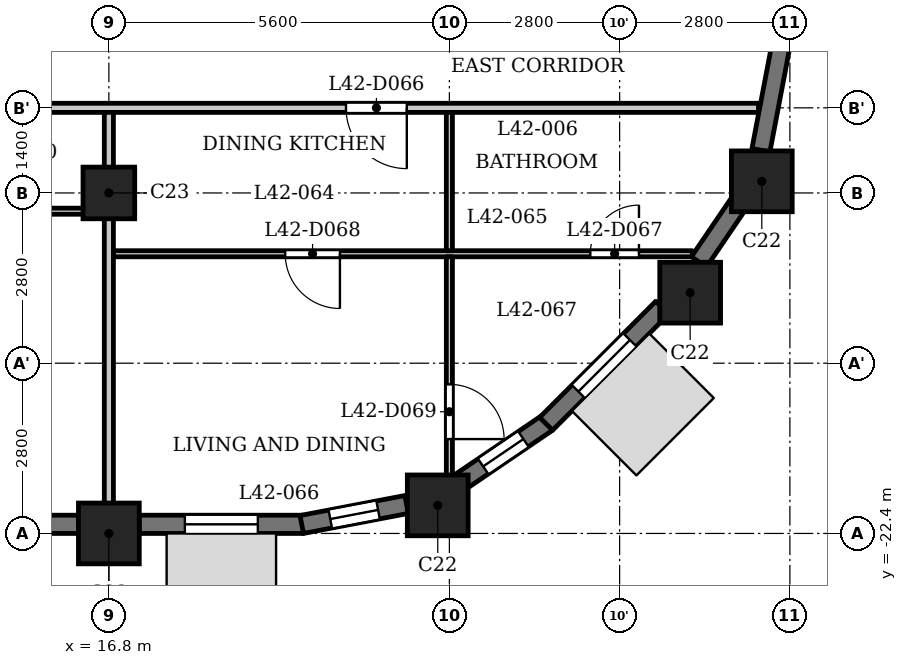
"""IFC4 building model, lengths in metres.
Left out: names, types, materials, properties, quantities, classifications, styles, units other than length and angle.
Written with IfcOpenShell. Run it as: python <this file> out.ifc"""

import sys

from ifc_helpers import new_model, si_unit, direction, frame, frame_2d, origin, origin_2d, place, context, subcontext, project, spatial, rectangle, extrude, element, fill, save


model = new_model("IFC4")
c1 = context("Model", 3, precision=1e-05, world=origin(), true_north=direction((0.0, 1.0)))
c2 = subcontext(c1, "Body", "Model", "MODEL_VIEW")
j1 = project(units=[si_unit("LENGTHUNIT", "METRE"), si_unit("PLANEANGLEUNIT", "RADIAN")], contexts=[c1])
p1 = place(None, origin())
s1 = spatial("IfcSite", under=j1, at=p1, CompositionType="ELEMENT")
p2 = place(p1, origin())
s2 = spatial("IfcBuilding", under=s1, at=p2, CompositionType="ELEMENT")
p3 = place(p2, frame((0.0, 0.0, 164.1)))
s3 = spatial("IfcBuildingStorey", under=s2, at=p3, CompositionType="ELEMENT", Elevation=164.1)
for number, where, z_axis, x_axis in (
    (1, (16.8, -22.4, 0.0), (0.0, 0.0, 1.0), (1.0, 0.0, 0.0)),
    (2, (22.209, -21.938, 0.0), (0.0, 0.0, 1.0), (1.0, 0.0, 0.0)),
    (3, (26.36, -18.44, 0.0), (0.0, 0.0, 1.0), (1.0, 0.0, 0.0)),
    (4, (27.538, -16.609, 0.0), (0.0, 0.0, 1.0), (1.0, 0.0, 0.0)),
):
    element("IfcColumn", number, at=place(p3, frame(where, z_axis=z_axis, x_axis=x_axis)), inside=s3, PredefinedType="COLUMN", context=c2, shape_type="SweptSolid", body=[
        extrude(rectangle(XDim=1.0, YDim=1.0, at=origin_2d()), origin(), (0.0, 0.0, 1.0), 3.5),
    ])
p4 = place(p3, frame((16.8, -16.8, 0.0), z_axis=(0.0, 0.0, 1.0), x_axis=(1.0, 0.0, 0.0)))
e5 = element("IfcColumn", 5, at=p4, inside=s3, PredefinedType="COLUMN", context=c2, shape_type="SweptSolid", body=[
    extrude(rectangle(XDim=0.85, YDim=0.85, at=origin_2d()), origin(), (0.0, 0.0, 1.0), 3.5),
])
p5 = place(p3, frame((11.7, -22.25, 0.0), z_axis=(0.0, 0.0, 1.0), x_axis=(1.0, 0.0, 0.0)))
e6 = element("IfcWall", 6, at=p5, inside=s3, PredefinedType="SOLIDWALL", context=c2, shape_type="SweptSolid", body=[
    extrude(rectangle(XDim=4.6, YDim=0.3, at=frame_2d((2.3, 0.0))), origin(), (0.0, 0.0, 1.0), 2.45),
])
p6 = place(p5, frame((0.5, 0.0, 1.2)))
e7 = element("IfcOpeningElement", 7, at=p6, cuts=e6, PredefinedType="OPENING", context=c2, shape_type="SweptSolid", body=[
    extrude(rectangle(XDim=3.6, YDim=0.95, at=frame_2d((1.8, 0.475))), frame((0.0, 0.16, 0.0), z_axis=(0.0, -1.0, 0.0), x_axis=(1.0, 0.0, 0.0)), (0.0, 0.0, 1.0), 0.32),
])
p7 = place(p3, frame((17.3, -22.25, 0.0), z_axis=(0.0, 0.0, 1.0), x_axis=(1.0, 0.0, 0.0)))
e8 = element("IfcWall", 8, at=p7, inside=s3, PredefinedType="SOLIDWALL", context=c2, shape_type="SweptSolid", body=[
    extrude(rectangle(XDim=2.7, YDim=0.3, at=frame_2d((1.35, 0.0))), origin(), (0.0, 0.0, 1.0), 2.45),
])
p8 = place(p7, frame((0.75, 0.0, 0.6)))
e9 = element("IfcOpeningElement", 9, at=p8, cuts=e8, PredefinedType="OPENING", context=c2, shape_type="SweptSolid", body=[
    extrude(rectangle(XDim=1.2, YDim=1.55, at=frame_2d((0.6, 0.775))), frame((0.0, 0.16, 0.0), z_axis=(0.0, -1.0, 0.0), x_axis=(1.0, 0.0, 0.0)), (0.0, 0.0, 1.0), 0.32),
])
p9 = place(p3, frame((19.972, -22.253, 0.0), z_axis=(0.0, 0.0, 1.0), x_axis=(0.982284988433, 0.187393173565, 0.0)))
e10 = element("IfcWall", 10, at=p9, inside=s3, PredefinedType="SOLIDWALL", context=c2, shape_type="SweptSolid", body=[
    extrude(rectangle(XDim=1.756, YDim=0.3, at=frame_2d((0.878, 0.0))), origin(), (0.0, 0.0, 1.0), 2.45),
])
p10 = place(p9, frame((0.478, 0.0, 0.6)))
e11 = element("IfcOpeningElement", 11, at=p10, cuts=e10, PredefinedType="OPENING", context=c2, shape_type="SweptSolid", body=[
    extrude(rectangle(XDim=0.8, YDim=1.55, at=frame_2d((0.4, 0.775))), frame((0.0, 0.16, 0.0), z_axis=(0.0, -1.0, 0.0), x_axis=(1.0, 0.0, 0.0)), (0.0, 0.0, 1.0), 0.32),
])
p11 = place(p3, frame((22.56, -21.566, 0.0), z_axis=(0.0, 0.0, 1.0), x_axis=(0.82707645233, 0.562089443061, 0.0)))
e12 = element("IfcWall", 12, at=p11, inside=s3, PredefinedType="SOLIDWALL", context=c2, shape_type="SweptSolid", body=[
    extrude(rectangle(XDim=1.756, YDim=0.3, at=frame_2d((0.878, 0.0))), origin(), (0.0, 0.0, 1.0), 2.45),
])
p12 = place(p11, frame((0.478, 0.0, 0.6)))
e13 = element("IfcOpeningElement", 13, at=p12, cuts=e12, PredefinedType="OPENING", context=c2, shape_type="SweptSolid", body=[
    extrude(rectangle(XDim=0.8, YDim=1.55, at=frame_2d((0.4, 0.775))), frame((0.0, 0.16, 0.0), z_axis=(0.0, -1.0, 0.0), x_axis=(1.0, 0.0, 0.0)), (0.0, 0.0, 1.0), 0.32),
])
p13 = place(p3, frame((23.991, -20.597, 0.0), z_axis=(0.0, 0.0, 1.0), x_axis=(0.707106781187, 0.707106781187, 0.0)))
e14 = element("IfcWall", 14, at=p13, inside=s3, PredefinedType="SOLIDWALL", context=c2, shape_type="SweptSolid", body=[
    extrude(rectangle(XDim=2.7, YDim=0.3, at=frame_2d((1.35, 0.0))), origin(), (0.0, 0.0, 1.0), 2.45),
])
p14 = place(p13, frame((0.75, 0.0, 0.6)))
e15 = element("IfcOpeningElement", 15, at=p14, cuts=e14, PredefinedType="OPENING", context=c2, shape_type="SweptSolid", body=[
    extrude(rectangle(XDim=1.2, YDim=1.55, at=frame_2d((0.6, 0.775))), frame((0.0, 0.16, 0.0), z_axis=(0.0, -1.0, 0.0), x_axis=(1.0, 0.0, 0.0)), (0.0, 0.0, 1.0), 0.32),
])
p15 = place(p3, frame((26.504, -17.934, 0.0), z_axis=(0.0, 0.0, 1.0), x_axis=(0.562145470373, 0.827038372833, 0.0)))
e16 = element("IfcWall", 16, at=p15, inside=s3, PredefinedType="SOLIDWALL", context=c2, shape_type="SweptSolid", body=[
    extrude(rectangle(XDim=1.177, YDim=0.3, at=frame_2d((0.588, 0.0))), origin(), (0.0, 0.0, 1.0), 3.2),
])
p16 = place(p3, frame((27.524, -16.097, 0.0), z_axis=(0.0, 0.0, 1.0), x_axis=(0.187259034321, 0.982310569049, 0.0)))
e17 = element("IfcWall", 17, at=p16, inside=s3, PredefinedType="SOLIDWALL", context=c2, shape_type="SweptSolid", body=[
    extrude(rectangle(XDim=1.756, YDim=0.3, at=frame_2d((0.878, 0.0))), origin(), (0.0, 0.0, 1.0), 2.45),
])
p17 = place(p3, frame((16.875, -17.8, 0.0), z_axis=(0.0, 0.0, 1.0), x_axis=(1.0, 0.0, 0.0)))
e18 = element("IfcWall", 18, at=p17, inside=s3, PredefinedType="PARTITIONING", context=c2, shape_type="SweptSolid", body=[
    extrude(rectangle(XDim=9.519, YDim=0.1, at=frame_2d((4.76, 0.0))), origin(), (0.0, 0.0, 1.0), 3.2),
])
p18 = place(p17, frame((7.843, 0.0, 0.0)))
e19 = element("IfcOpeningElement", 19, at=p18, cuts=e18, PredefinedType="OPENING", context=c2, shape_type="SweptSolid", body=[
    extrude(rectangle(XDim=0.8, YDim=2.1, at=frame_2d((0.4, 1.05))), frame((0.0, 0.06, 0.0), z_axis=(0.0, -1.0, 0.0), x_axis=(1.0, 0.0, 0.0)), (0.0, 0.0, 1.0), 0.12),
])
p19 = place(p17, frame((2.825, 0.0, 0.0)))
e20 = element("IfcOpeningElement", 20, at=p19, cuts=e18, PredefinedType="OPENING", context=c2, shape_type="SweptSolid", body=[
    extrude(rectangle(XDim=0.9, YDim=2.1, at=frame_2d((0.45, 1.05))), frame((0.0, 0.06, 0.0), z_axis=(0.0, -1.0, 0.0), x_axis=(1.0, 0.0, 0.0)), (0.0, 0.0, 1.0), 0.12),
])
p20 = place(p3, frame((-16.725, -17.1, 0.0), z_axis=(0.0, 0.0, 1.0), x_axis=(1.0, 0.0, 0.0)))
e21 = element("IfcWall", 21, at=p20, inside=s3, PredefinedType="PARTITIONING", context=c2, shape_type="SweptSolid", body=[
    extrude(rectangle(XDim=33.45, YDim=0.1, at=frame_2d((16.725, 0.0))), origin(), (0.0, 0.0, 1.0), 3.2),
])
p21 = place(p20, frame((0.725, 0.0, 0.0)))
e22 = element("IfcOpeningElement", 22, at=p21, cuts=e21, PredefinedType="OPENING", context=c2, shape_type="SweptSolid", body=[
    extrude(rectangle(XDim=0.8, YDim=2.1, at=frame_2d((0.4, 1.05))), frame((0.0, 0.06, 0.0), z_axis=(0.0, -1.0, 0.0), x_axis=(1.0, 0.0, 0.0)), (0.0, 0.0, 1.0), 0.12),
])
p22 = place(p20, frame((3.175, 0.0, 0.0)))
e23 = element("IfcOpeningElement", 23, at=p22, cuts=e21, PredefinedType="OPENING", context=c2, shape_type="SweptSolid", body=[
    extrude(rectangle(XDim=0.9, YDim=2.1, at=frame_2d((0.45, 1.05))), frame((0.0, 0.06, 0.0), z_axis=(0.0, -1.0, 0.0), x_axis=(1.0, 0.0, 0.0)), (0.0, 0.0, 1.0), 0.12),
])
p23 = place(p20, frame((6.075, 0.0, 0.0)))
e24 = element("IfcOpeningElement", 24, at=p23, cuts=e21, PredefinedType="OPENING", context=c2, shape_type="SweptSolid", body=[
    extrude(rectangle(XDim=0.8, YDim=2.1, at=frame_2d((0.4, 1.05))), frame((0.0, 0.06, 0.0), z_axis=(0.0, -1.0, 0.0), x_axis=(1.0, 0.0, 0.0)), (0.0, 0.0, 1.0), 0.12),
])
p24 = place(p20, frame((9.425, 0.0, 0.0)))
e25 = element("IfcOpeningElement", 25, at=p24, cuts=e21, PredefinedType="OPENING", context=c2, shape_type="SweptSolid", body=[
    extrude(rectangle(XDim=0.9, YDim=2.1, at=frame_2d((0.45, 1.05))), frame((0.0, 0.06, 0.0), z_axis=(0.0, -1.0, 0.0), x_axis=(1.0, 0.0, 0.0)), (0.0, 0.0, 1.0), 0.12),
])
p25 = place(p20, frame((12.675, 0.0, 0.0)))
e26 = element("IfcOpeningElement", 26, at=p25, cuts=e21, PredefinedType="OPENING", context=c2, shape_type="SweptSolid", body=[
    extrude(rectangle(XDim=0.8, YDim=2.1, at=frame_2d((0.4, 1.05))), frame((0.0, 0.06, 0.0), z_axis=(0.0, -1.0, 0.0), x_axis=(1.0, 0.0, 0.0)), (0.0, 0.0, 1.0), 0.12),
])
p26 = place(p20, frame((15.275, 0.0, 0.0)))
e27 = element("IfcOpeningElement", 27, at=p26, cuts=e21, PredefinedType="OPENING", context=c2, shape_type="SweptSolid", body=[
    extrude(rectangle(XDim=0.9, YDim=2.1, at=frame_2d((0.45, 1.05))), frame((0.0, 0.06, 0.0), z_axis=(0.0, -1.0, 0.0), x_axis=(1.0, 0.0, 0.0)), (0.0, 0.0, 1.0), 0.12),
])
p27 = place(p20, frame((20.625, 0.0, 0.0)))
e28 = element("IfcOpeningElement", 28, at=p27, cuts=e21, PredefinedType="OPENING", context=c2, shape_type="SweptSolid", body=[
    extrude(rectangle(XDim=0.8, YDim=2.1, at=frame_2d((0.4, 1.05))), frame((0.0, 0.06, 0.0), z_axis=(0.0, -1.0, 0.0), x_axis=(1.0, 0.0, 0.0)), (0.0, 0.0, 1.0), 0.12),
])
p28 = place(p20, frame((17.375, 0.0, 0.0)))
e29 = element("IfcOpeningElement", 29, at=p28, cuts=e21, PredefinedType="OPENING", context=c2, shape_type="SweptSolid", body=[
    extrude(rectangle(XDim=0.9, YDim=2.1, at=frame_2d((0.45, 1.05))), frame((0.0, 0.06, 0.0), z_axis=(0.0, -1.0, 0.0), x_axis=(1.0, 0.0, 0.0)), (0.0, 0.0, 1.0), 0.12),
])
p29 = place(p20, frame((31.075, 0.0, 0.0)))
e30 = element("IfcOpeningElement", 30, at=p29, cuts=e21, PredefinedType="OPENING", context=c2, shape_type="SweptSolid", body=[
    extrude(rectangle(XDim=0.8, YDim=2.1, at=frame_2d((0.4, 1.05))), frame((0.0, 0.06, 0.0), z_axis=(0.0, -1.0, 0.0), x_axis=(1.0, 0.0, 0.0)), (0.0, 0.0, 1.0), 0.12),
])
p30 = place(p20, frame((29.325, 0.0, 0.0)))
e31 = element("IfcOpeningElement", 31, at=p30, cuts=e21, PredefinedType="OPENING", context=c2, shape_type="SweptSolid", body=[
    extrude(rectangle(XDim=0.9, YDim=2.1, at=frame_2d((0.45, 1.05))), frame((0.0, 0.06, 0.0), z_axis=(0.0, -1.0, 0.0), x_axis=(1.0, 0.0, 0.0)), (0.0, 0.0, 1.0), 0.12),
])
p31 = place(p20, frame((23.725, 0.0, 0.0)))
e32 = element("IfcOpeningElement", 32, at=p31, cuts=e21, PredefinedType="OPENING", context=c2, shape_type="SweptSolid", body=[
    extrude(rectangle(XDim=0.9, YDim=2.1, at=frame_2d((0.45, 1.05))), frame((0.0, 0.06, 0.0), z_axis=(0.0, -1.0, 0.0), x_axis=(1.0, 0.0, 0.0)), (0.0, 0.0, 1.0), 0.12),
])
p32 = place(p20, frame((25.775, 0.0, 0.0)))
e33 = element("IfcOpeningElement", 33, at=p32, cuts=e21, PredefinedType="OPENING", context=c2, shape_type="SweptSolid", body=[
    extrude(rectangle(XDim=0.9, YDim=2.1, at=frame_2d((0.45, 1.05))), frame((0.0, 0.06, 0.0), z_axis=(0.0, -1.0, 0.0), x_axis=(1.0, 0.0, 0.0)), (0.0, 0.0, 1.0), 0.12),
])
p33 = place(p3, frame((14.925, -15.4, 0.0), z_axis=(0.0, 0.0, 1.0), x_axis=(1.0, 0.0, 0.0)))
e34 = element("IfcWall", 34, at=p33, inside=s3, PredefinedType="PARTITIONING", context=c2, shape_type="SweptSolid", body=[
    extrude(rectangle(XDim=12.559, YDim=0.15, at=frame_2d((6.279, 0.0))), origin(), (0.0, 0.0, 1.0), 3.2),
])
p34 = place(p33, frame((5.775, 0.0, 0.0)))
e35 = element("IfcOpeningElement", 35, at=p34, cuts=e34, PredefinedType="OPENING", context=c2, shape_type="SweptSolid", body=[
    extrude(rectangle(XDim=1.0, YDim=2.1, at=frame_2d((0.5, 1.05))), frame((0.0, 0.085, 0.0), z_axis=(0.0, -1.0, 0.0), x_axis=(1.0, 0.0, 0.0)), (0.0, 0.0, 1.0), 0.17),
])
p35 = place(p3, frame((16.8, -22.88, 0.0), z_axis=(0.0, 0.0, 1.0), x_axis=(0.0, 1.0, 0.0)))
e36 = element("IfcWall", 36, at=p35, inside=s3, PredefinedType="PARTITIONING", context=c2, shape_type="SweptSolid", body=[
    extrude(rectangle(XDim=7.405, YDim=0.15, at=frame_2d((3.702, 0.0))), origin(), (0.0, 0.0, 1.0), 3.2),
])
p36 = place(p3, frame((22.4, -21.72, 0.0), z_axis=(0.0, 0.0, 1.0), x_axis=(0.0, 1.0, 0.0)))
e37 = element("IfcWall", 37, at=p36, inside=s3, PredefinedType="PARTITIONING", context=c2, shape_type="SweptSolid", body=[
    extrude(rectangle(XDim=3.87, YDim=0.1, at=frame_2d((1.935, 0.0))), origin(), (0.0, 0.0, 1.0), 3.2),
])
p37 = place(p36, frame((0.872, 0.0, 0.0)))
e38 = element("IfcOpeningElement", 38, at=p37, cuts=e37, PredefinedType="OPENING", context=c2, shape_type="SweptSolid", body=[
    extrude(rectangle(XDim=0.9, YDim=2.1, at=frame_2d((0.45, 1.05))), frame((0.0, 0.06, 0.0), z_axis=(0.0, -1.0, 0.0), x_axis=(1.0, 0.0, 0.0)), (0.0, 0.0, 1.0), 0.12),
])
p38 = place(p3, frame((22.4, -17.75, 0.0), z_axis=(0.0, 0.0, 1.0), x_axis=(0.0, 1.0, 0.0)))
e39 = element("IfcWall", 39, at=p38, inside=s3, PredefinedType="PARTITIONING", context=c2, shape_type="SweptSolid", body=[
    extrude(rectangle(XDim=2.275, YDim=0.1, at=frame_2d((1.137, 0.0))), origin(), (0.0, 0.0, 1.0), 3.2),
])
p39 = place(p34, origin())
e40 = element("IfcDoor", 40, at=p39, inside=s3, OperationType="SINGLE_SWING_RIGHT", PredefinedType="DOOR", context=c2, shape_type="SweptSolid", body=[
    extrude(rectangle(XDim=1.0, YDim=2.1, at=frame_2d((0.5, 1.05))), frame((0.0, 0.025, 0.0), z_axis=(0.0, -1.0, 0.0), x_axis=(1.0, 0.0, 0.0)), (0.0, 0.0, 1.0), 0.05),
])
fill(e35, e40)
p40 = place(p18, origin())
e41 = element("IfcDoor", 41, at=p40, inside=s3, OperationType="SINGLE_SWING_LEFT", PredefinedType="DOOR", context=c2, shape_type="SweptSolid", body=[
    extrude(rectangle(XDim=0.8, YDim=2.1, at=frame_2d((0.4, 1.05))), frame((0.0, 0.025, 0.0), z_axis=(0.0, -1.0, 0.0), x_axis=(1.0, 0.0, 0.0)), (0.0, 0.0, 1.0), 0.05),
])
fill(e19, e41)
p41 = place(p19, origin())
e42 = element("IfcDoor", 42, at=p41, inside=s3, OperationType="SINGLE_SWING_RIGHT", PredefinedType="DOOR", context=c2, shape_type="SweptSolid", body=[
    extrude(rectangle(XDim=0.9, YDim=2.1, at=frame_2d((0.45, 1.05))), frame((0.0, 0.025, 0.0), z_axis=(0.0, -1.0, 0.0), x_axis=(1.0, 0.0, 0.0)), (0.0, 0.0, 1.0), 0.05),
])
fill(e20, e42)
p42 = place(p37, origin())
e43 = element("IfcDoor", 43, at=p42, inside=s3, OperationType="SINGLE_SWING_LEFT", PredefinedType="DOOR", context=c2, shape_type="SweptSolid", body=[
    extrude(rectangle(XDim=0.9, YDim=2.1, at=frame_2d((0.45, 1.05))), frame((0.0, 0.025, 0.0), z_axis=(0.0, -1.0, 0.0), x_axis=(1.0, 0.0, 0.0)), (0.0, 0.0, 1.0), 0.05),
])
fill(e38, e43)
p43 = place(p8, origin())
e44 = element("IfcWindow", 44, at=p43, inside=s3, PartitioningType="SINGLE_PANEL", PredefinedType="WINDOW", context=c2, shape_type="SweptSolid", body=[
    extrude(rectangle(XDim=1.2, YDim=1.55, at=frame_2d((0.6, 0.775))), frame((0.0, 0.03, 0.0), z_axis=(0.0, -1.0, 0.0), x_axis=(1.0, 0.0, 0.0)), (0.0, 0.0, 1.0), 0.06),
])
fill(e9, e44)
p44 = place(p10, origin())
e45 = element("IfcWindow", 45, at=p44, inside=s3, PartitioningType="SINGLE_PANEL", PredefinedType="WINDOW", context=c2, shape_type="SweptSolid", body=[
    extrude(rectangle(XDim=0.8, YDim=1.55, at=frame_2d((0.4, 0.775))), frame((0.0, 0.03, 0.0), z_axis=(0.0, -1.0, 0.0), x_axis=(1.0, 0.0, 0.0)), (0.0, 0.0, 1.0), 0.06),
])
fill(e11, e45)
p45 = place(p12, origin())
e46 = element("IfcWindow", 46, at=p45, inside=s3, PartitioningType="SINGLE_PANEL", PredefinedType="WINDOW", context=c2, shape_type="SweptSolid", body=[
    extrude(rectangle(XDim=0.8, YDim=1.55, at=frame_2d((0.4, 0.775))), frame((0.0, 0.03, 0.0), z_axis=(0.0, -1.0, 0.0), x_axis=(1.0, 0.0, 0.0)), (0.0, 0.0, 1.0), 0.06),
])
fill(e13, e46)
p46 = place(p14, origin())
e47 = element("IfcWindow", 47, at=p46, inside=s3, PartitioningType="SINGLE_PANEL", PredefinedType="WINDOW", context=c2, shape_type="SweptSolid", body=[
    extrude(rectangle(XDim=1.2, YDim=1.55, at=frame_2d((0.6, 0.775))), frame((0.0, 0.03, 0.0), z_axis=(0.0, -1.0, 0.0), x_axis=(1.0, 0.0, 0.0)), (0.0, 0.0, 1.0), 0.06),
])
fill(e15, e47)
save(model, sys.argv[1])
